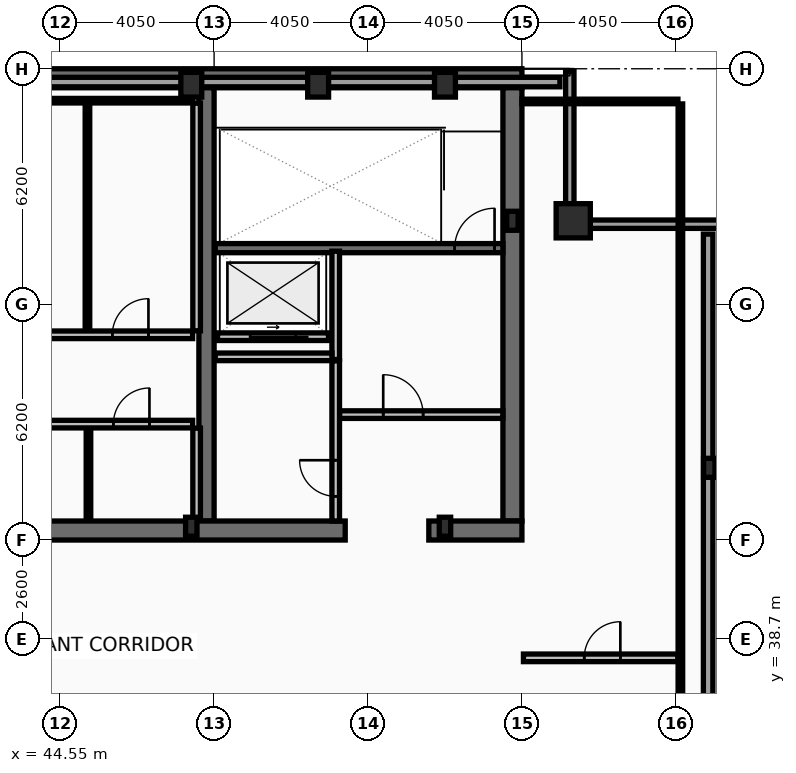
"""IFC4 building model, lengths in metres.
Left out: names, types, materials, properties, quantities, classifications, styles, units other than length and angle.
Written with IfcOpenShell. Run it as: python <this file> out.ifc"""

import sys

from ifc_helpers import new_model, si_unit, direction, frame, frame_2d, origin, origin_2d, place, context, subcontext, project, spatial, rectangle, hollow_rectangle, i_section, extrude, element, fill, save


model = new_model("IFC4")
c1 = context("Model", 3, precision=1e-05, world=origin(), true_north=direction((0.0, 1.0)))
c2 = subcontext(c1, "Body", "Model", "MODEL_VIEW")
j1 = project(units=[si_unit("LENGTHUNIT", "METRE"), si_unit("PLANEANGLEUNIT", "RADIAN")], contexts=[c1])
p1 = place(None, origin())
s1 = spatial("IfcSite", under=j1, at=p1, CompositionType="ELEMENT")
p2 = place(p1, origin())
s2 = spatial("IfcBuilding", under=s1, at=p2, CompositionType="ELEMENT")
p3 = place(p2, frame((0.0, 0.0, 378.6)))
s3 = spatial("IfcBuildingStorey", under=s2, at=p3, CompositionType="ELEMENT", Elevation=378.6)
p4 = place(p3, frame((16.2, 53.45, 0.0), z_axis=(0.0, 0.0, 1.0), x_axis=(1.0, 0.0, 0.0)))
e1 = element("IfcWall", 1, at=p4, inside=s3, PredefinedType="SHEAR", context=c2, shape_type="SweptSolid", body=[
    extrude(rectangle(XDim=40.5, YDim=0.5, at=frame_2d((20.25, 0.0))), origin(), (0.0, 0.0, 1.0), 4.0),
])
p5 = place(p3, frame((56.45, 53.2, 0.0), z_axis=(0.0, 0.0, 1.0), x_axis=(0.0, -1.0, 0.0)))
e2 = element("IfcWall", 2, at=p5, inside=s3, PredefinedType="SHEAR", context=c2, shape_type="SweptSolid", body=[
    extrude(rectangle(XDim=11.4, YDim=0.5, at=frame_2d((5.7, 0.0))), origin(), (0.0, 0.0, 1.0), 4.0),
])
p6 = place(p3, frame((48.4, 41.8, 0.0), z_axis=(0.0, 0.0, 1.0), x_axis=(0.0, 1.0, 0.0)))
e3 = element("IfcWall", 3, at=p6, inside=s3, PredefinedType="SHEAR", context=c2, shape_type="SweptSolid", body=[
    extrude(rectangle(XDim=11.4, YDim=0.4, at=frame_2d((5.7, 0.0))), origin(), (0.0, 0.0, 1.0), 4.0),
])
p7 = place(p3, frame((52.05, 41.55, 0.0), z_axis=(0.0, 0.0, 1.0), x_axis=(-1.0, 0.0, 0.0)))
e4 = element("IfcWall", 4, at=p7, inside=s3, PredefinedType="SHEAR", context=c2, shape_type="SweptSolid", body=[
    extrude(rectangle(XDim=11.3, YDim=0.5, at=frame_2d((5.65, 0.0))), origin(), (0.0, 0.0, 1.0), 4.0),
])
p8 = place(p3, frame((56.7, 41.55, 0.0), z_axis=(0.0, 0.0, 1.0), x_axis=(-1.0, 0.0, 0.0)))
e5 = element("IfcWall", 5, at=p8, inside=s3, PredefinedType="SHEAR", context=c2, shape_type="SweptSolid", body=[
    extrude(rectangle(XDim=2.45, YDim=0.5, at=frame_2d((1.225, 0.0))), origin(), (0.0, 0.0, 1.0), 4.0),
])
p9 = place(p3, frame((48.63, 48.98, 0.0), z_axis=(0.0, 0.0, 1.0), x_axis=(1.0, 0.0, 0.0)))
e6 = element("IfcWall", 6, at=p9, inside=s3, PredefinedType="SHEAR", context=c2, shape_type="SweptSolid", body=[
    extrude(rectangle(XDim=7.57, YDim=0.24, at=frame_2d((3.785, 0.0))), origin(), (0.0, 0.0, 1.0), 4.0),
])
p10 = place(p9, frame((6.3, 0.0, 0.0)))
e7 = element("IfcOpeningElement", 7, at=p10, cuts=e6, PredefinedType="OPENING", context=c2, shape_type="SweptSolid", body=[
    extrude(rectangle(XDim=1.05, YDim=2.15, at=frame_2d((0.525, 1.075))), frame((0.0, 0.13, 0.0), z_axis=(0.0, -1.0, 0.0), x_axis=(1.0, 0.0, 0.0)), (0.0, 0.0, 1.0), 0.26),
])
p11 = place(p3, frame((58.05, 49.7, 0.0), z_axis=(0.0, 0.0, 1.0), x_axis=(1.0, 0.0, 0.0)))
e8 = element("IfcColumn", 8, at=p11, inside=s3, PredefinedType="COLUMN", context=c2, shape_type="SweptSolid", body=[
    extrude(hollow_rectangle(XDim=0.9, YDim=0.9, WallThickness=0.05, at=origin_2d()), origin(), (0.0, 0.0, 1.0), 5.36),
])
for number, where, z_axis, x_axis in (
    (9, (48.0, 53.28, 0.0), (0.0, 0.0, 1.0), (1.0, 0.0, 0.0)),
    (10, (51.337, 53.28, 0.0), (0.0, 0.0, 1.0), (1.0, 0.0, 0.0)),
    (11, (54.675, 53.28, 0.0), (0.0, 0.0, 1.0), (1.0, 0.0, 0.0)),
):
    element("IfcColumn", number, at=place(p3, frame(where, z_axis=z_axis, x_axis=x_axis)), inside=s3, PredefinedType="COLUMN", context=c2, shape_type="SweptSolid", body=[
        extrude(hollow_rectangle(XDim=0.55, YDim=0.65, WallThickness=0.04, at=origin_2d()), origin(), (0.0, 0.0, 1.0), 5.36),
    ])
for number, where, z_axis, x_axis in (
    (12, (61.63, 43.2, 0.0), (0.0, 0.0, 1.0), (1.0, 0.0, 0.0)),
    (13, (56.45, 49.7, 0.0), (0.0, 0.0, 1.0), (1.0, 0.0, 0.0)),
    (14, (48.0, 41.65, 0.0), (0.0, 0.0, 1.0), (1.0, 0.0, 0.0)),
):
    element("IfcColumn", number, at=place(p3, frame(where, z_axis=z_axis, x_axis=x_axis)), inside=s3, PredefinedType="COLUMN", context=c2, shape_type="SweptSolid", body=[
        extrude(i_section(OverallWidth=0.3, OverallDepth=0.5, WebThickness=0.014, FlangeThickness=0.028, at=origin_2d()), origin(), (0.0, 0.0, 1.0), 5.36),
    ])
p12 = place(p3, frame((54.675, 41.65, 0.0), z_axis=(0.0, 0.0, 1.0), x_axis=(1.0, 0.0, 0.0)))
e15 = element("IfcColumn", 15, at=p12, inside=s3, PredefinedType="COLUMN", context=c2, shape_type="SweptSolid", body=[
    extrude(i_section(OverallWidth=0.3, OverallDepth=0.5, WebThickness=0.014, FlangeThickness=0.028, at=origin_2d()), origin(), (0.0, 0.0, 1.0), 4.1),
])
p13 = place(p3, frame((57.96, 53.63, 0.0), z_axis=(0.0, 0.0, 1.0), x_axis=(0.0, -1.0, 0.0)))
e16 = element("IfcWall", 16, at=p13, inside=s3, PredefinedType="SOLIDWALL", context=c2, shape_type="SweptSolid", body=[
    extrude(rectangle(XDim=3.91, YDim=0.22, at=frame_2d((1.955, 0.0))), origin(), (0.0, 0.0, 1.0), 3.62),
])
p14 = place(p3, frame((57.85, 49.61, 0.0), z_axis=(0.0, 0.0, 1.0), x_axis=(1.0, 0.0, 0.0)))
e17 = element("IfcWall", 17, at=p14, inside=s3, PredefinedType="SOLIDWALL", context=c2, shape_type="SweptSolid", body=[
    extrude(rectangle(XDim=4.13, YDim=0.22, at=frame_2d((2.065, 0.0))), origin(), (0.0, 0.0, 1.0), 3.62),
])
p15 = place(p3, frame((57.7, 53.35, 5.58), z_axis=(0.0, 0.0, 1.0), x_axis=(-1.0, 0.0, 0.0)))
e18 = element("IfcWall", 18, at=p15, inside=s3, PredefinedType="PARAPET", context=c2, shape_type="SweptSolid", body=[
    extrude(rectangle(XDim=42.5, YDim=0.25, at=frame_2d((21.25, 0.0))), origin(), (0.0, 0.0, 1.0), 0.9),
])
p16 = place(p3, frame((61.6, 14.05, 5.58), z_axis=(0.0, 0.0, 1.0), x_axis=(0.0, 1.0, 0.0)))
e19 = element("IfcWall", 19, at=p16, inside=s3, PredefinedType="PARAPET", context=c2, shape_type="SweptSolid", body=[
    extrude(rectangle(XDim=35.3, YDim=0.25, at=frame_2d((17.65, 0.0))), origin(), (0.0, 0.0, 1.0), 0.9),
])
p17 = place(p3, frame((51.61, 46.65, 0.0), z_axis=(0.0, 0.0, 1.0), x_axis=(-1.0, 0.0, 0.0)))
e20 = element("IfcWall", 20, at=p17, inside=s3, PredefinedType="PARTITIONING", context=c2, shape_type="SweptSolid", body=[
    extrude(rectangle(XDim=2.92, YDim=0.2, at=frame_2d((1.46, 0.0))), origin(), (0.0, 0.0, 1.0), 4.18),
])
p18 = place(p17, frame((0.86, 0.0, 0.0)))
e21 = element("IfcOpeningElement", 21, at=p18, cuts=e20, PredefinedType="OPENING", context=c2, shape_type="SweptSolid", body=[
    extrude(rectangle(XDim=1.2, YDim=2.18, at=frame_2d((0.6, 1.09))), frame((0.0, 0.11, 0.0), z_axis=(0.0, -1.0, 0.0), x_axis=(1.0, 0.0, 0.0)), (0.0, 0.0, 1.0), 0.22),
])
p19 = place(p3, frame((51.8, 46.05, 0.0), z_axis=(0.0, 0.0, 1.0), x_axis=(0.0, 1.0, 0.0)))
e22 = element("IfcWall", 22, at=p19, inside=s3, PredefinedType="PARTITIONING", context=c2, shape_type="SweptSolid", body=[
    extrude(rectangle(XDim=2.85, YDim=0.2, at=frame_2d((1.425, 0.0))), origin(), (0.0, 0.0, 1.0), 4.18),
])
p20 = place(p3, frame((51.9, 44.6, 0.0), z_axis=(0.0, 0.0, 1.0), x_axis=(1.0, 0.0, 0.0)))
e23 = element("IfcWall", 23, at=p20, inside=s3, PredefinedType="PARTITIONING", context=c2, shape_type="SweptSolid", body=[
    extrude(rectangle(XDim=4.3, YDim=0.2, at=frame_2d((2.15, 0.0))), origin(), (0.0, 0.0, 1.0), 4.18),
])
p21 = place(p20, frame((1.15, 0.0, 0.0)))
e24 = element("IfcOpeningElement", 24, at=p21, cuts=e23, PredefinedType="OPENING", context=c2, shape_type="SweptSolid", body=[
    extrude(rectangle(XDim=1.05, YDim=2.15, at=frame_2d((0.525, 1.075))), frame((0.0, 0.11, 0.0), z_axis=(0.0, -1.0, 0.0), x_axis=(1.0, 0.0, 0.0)), (0.0, 0.0, 1.0), 0.22),
])
p22 = place(p3, frame((48.63, 46.12, 0.0), z_axis=(0.0, 0.0, 1.0), x_axis=(1.0, 0.0, 0.0)))
e25 = element("IfcWall", 25, at=p22, inside=s3, PredefinedType="PARTITIONING", context=c2, shape_type="SweptSolid", body=[
    extrude(rectangle(XDim=3.07, YDim=0.2, at=frame_2d((1.535, 0.0))), origin(), (0.0, 0.0, 1.0), 4.18),
])
p23 = place(p3, frame((51.8, 41.8, 0.0), z_axis=(0.0, 0.0, 1.0), x_axis=(0.0, 1.0, 0.0)))
e26 = element("IfcWall", 26, at=p23, inside=s3, PredefinedType="PARTITIONING", context=c2, shape_type="SweptSolid", body=[
    extrude(rectangle(XDim=4.215, YDim=0.2, at=frame_2d((2.107, 0.0))), origin(), (0.0, 0.0, 1.0), 4.18),
])
p24 = place(p23, frame((0.65, 0.0, 0.0)))
e27 = element("IfcOpeningElement", 27, at=p24, cuts=e26, PredefinedType="OPENING", context=c2, shape_type="SweptSolid", body=[
    extrude(rectangle(XDim=0.95, YDim=2.1, at=frame_2d((0.475, 1.05))), frame((0.0, 0.11, 0.0), z_axis=(0.0, -1.0, 0.0), x_axis=(1.0, 0.0, 0.0)), (0.0, 0.0, 1.0), 0.22),
])
p25 = place(p3, frame((48.14, 46.805, 0.0), z_axis=(0.0, 0.0, 1.0), x_axis=(0.0, 1.0, 0.0)))
e28 = element("IfcWall", 28, at=p25, inside=s3, PredefinedType="PARTITIONING", context=c2, shape_type="SweptSolid", body=[
    extrude(rectangle(XDim=5.99, YDim=0.2, at=frame_2d((2.995, 0.0))), origin(), (0.0, 0.0, 1.0), 4.18),
])
p26 = place(p3, frame((40.685, 52.86, 0.0), z_axis=(0.0, 0.0, 1.0), x_axis=(1.0, 0.0, 0.0)))
e29 = element("IfcWall", 29, at=p26, inside=s3, PredefinedType="PARTITIONING", context=c2, shape_type="SweptSolid", body=[
    extrude(rectangle(XDim=7.35, YDim=0.12, at=frame_2d((3.675, 0.0))), origin(), (0.0, 0.0, 1.0), 4.18),
])
p27 = place(p3, frame((45.267, 46.805, 0.0), z_axis=(0.0, 0.0, 1.0), x_axis=(0.0, 1.0, 0.0)))
e30 = element("IfcWall", 30, at=p27, inside=s3, PredefinedType="PARTITIONING", context=c2, shape_type="SweptSolid", body=[
    extrude(rectangle(XDim=5.99, YDim=0.12, at=frame_2d((2.995, 0.0))), origin(), (0.0, 0.0, 1.0), 4.18),
])
p28 = place(p3, frame((40.685, 46.7, 0.0), z_axis=(0.0, 0.0, 1.0), x_axis=(1.0, 0.0, 0.0)))
e31 = element("IfcWall", 31, at=p28, inside=s3, PredefinedType="PARTITIONING", context=c2, shape_type="SweptSolid", body=[
    extrude(rectangle(XDim=7.35, YDim=0.2, at=frame_2d((3.675, 0.0))), origin(), (0.0, 0.0, 1.0), 4.18),
])
p29 = place(p28, frame((1.15, 0.0, 0.0)))
e32 = element("IfcOpeningElement", 32, at=p29, cuts=e31, PredefinedType="OPENING", context=c2, shape_type="SweptSolid", body=[
    extrude(rectangle(XDim=0.95, YDim=2.1, at=frame_2d((0.475, 1.05))), frame((0.0, 0.11, 0.0), z_axis=(0.0, -1.0, 0.0), x_axis=(1.0, 0.0, 0.0)), (0.0, 0.0, 1.0), 0.22),
])
p30 = place(p28, frame((5.237, 0.0, 0.0)))
e33 = element("IfcOpeningElement", 33, at=p30, cuts=e31, PredefinedType="OPENING", context=c2, shape_type="SweptSolid", body=[
    extrude(rectangle(XDim=0.95, YDim=2.1, at=frame_2d((0.475, 1.05))), frame((0.0, 0.11, 0.0), z_axis=(0.0, -1.0, 0.0), x_axis=(1.0, 0.0, 0.0)), (0.0, 0.0, 1.0), 0.22),
])
p31 = place(p3, frame((48.14, 41.85, 0.0), z_axis=(0.0, 0.0, 1.0), x_axis=(0.0, 1.0, 0.0)))
e34 = element("IfcWall", 34, at=p31, inside=s3, PredefinedType="PARTITIONING", context=c2, shape_type="SweptSolid", body=[
    extrude(rectangle(XDim=2.395, YDim=0.2, at=frame_2d((1.198, 0.0))), origin(), (0.0, 0.0, 1.0), 4.18),
])
p32 = place(p3, frame((45.294, 41.85, 0.0), z_axis=(0.0, 0.0, 1.0), x_axis=(0.0, 1.0, 0.0)))
e35 = element("IfcWall", 35, at=p32, inside=s3, PredefinedType="PARTITIONING", context=c2, shape_type="SweptSolid", body=[
    extrude(rectangle(XDim=2.395, YDim=0.12, at=frame_2d((1.198, 0.0))), origin(), (0.0, 0.0, 1.0), 4.18),
])
p33 = place(p3, frame((40.755, 44.35, 0.0), z_axis=(0.0, 0.0, 1.0), x_axis=(1.0, 0.0, 0.0)))
e36 = element("IfcWall", 36, at=p33, inside=s3, PredefinedType="PARTITIONING", context=c2, shape_type="SweptSolid", body=[
    extrude(rectangle(XDim=7.28, YDim=0.2, at=frame_2d((3.64, 0.0))), origin(), (0.0, 0.0, 1.0), 4.18),
])
p34 = place(p33, frame((1.15, 0.0, 0.0)))
e37 = element("IfcOpeningElement", 37, at=p34, cuts=e36, PredefinedType="OPENING", context=c2, shape_type="SweptSolid", body=[
    extrude(rectangle(XDim=0.95, YDim=2.1, at=frame_2d((0.475, 1.05))), frame((0.0, 0.11, 0.0), z_axis=(0.0, -1.0, 0.0), x_axis=(1.0, 0.0, 0.0)), (0.0, 0.0, 1.0), 0.22),
])
p35 = place(p33, frame((5.194, 0.0, 0.0)))
e38 = element("IfcOpeningElement", 38, at=p35, cuts=e36, PredefinedType="OPENING", context=c2, shape_type="SweptSolid", body=[
    extrude(rectangle(XDim=0.95, YDim=2.1, at=frame_2d((0.475, 1.05))), frame((0.0, 0.11, 0.0), z_axis=(0.0, -1.0, 0.0), x_axis=(1.0, 0.0, 0.0)), (0.0, 0.0, 1.0), 0.22),
])
p36 = place(p3, frame((56.74, 38.2, 0.0), z_axis=(0.0, 0.0, 1.0), x_axis=(1.0, 0.0, 0.0)))
e39 = element("IfcWall", 39, at=p36, inside=s3, PredefinedType="PARTITIONING", context=c2, shape_type="SweptSolid", body=[
    extrude(rectangle(XDim=4.065, YDim=0.2, at=frame_2d((2.032, 0.0))), origin(), (0.0, 0.0, 1.0), 4.18),
])
p37 = place(p36, frame((1.6, 0.0, 0.0)))
e40 = element("IfcOpeningElement", 40, at=p37, cuts=e39, PredefinedType="OPENING", context=c2, shape_type="SweptSolid", body=[
    extrude(rectangle(XDim=0.95, YDim=2.1, at=frame_2d((0.475, 1.05))), frame((0.0, 0.11, 0.0), z_axis=(0.0, -1.0, 0.0), x_axis=(1.0, 0.0, 0.0)), (0.0, 0.0, 1.0), 0.22),
])
p38 = place(p3, frame((60.87, 10.665, 0.0), z_axis=(0.0, 0.0, 1.0), x_axis=(0.0, 1.0, 0.0)))
e41 = element("IfcWall", 41, at=p38, inside=s3, PredefinedType="PARTITIONING", context=c2, shape_type="SweptSolid", body=[
    extrude(rectangle(XDim=42.11, YDim=0.12, at=frame_2d((21.055, 0.0))), origin(), (0.0, 0.0, 1.0), 4.18),
])
p39 = place(p3, frame((56.7, 52.84, 0.0), z_axis=(0.0, 0.0, 1.0), x_axis=(1.0, 0.0, 0.0)))
e42 = element("IfcWall", 42, at=p39, inside=s3, PredefinedType="PARTITIONING", context=c2, shape_type="SweptSolid", body=[
    extrude(rectangle(XDim=4.105, YDim=0.12, at=frame_2d((2.052, 0.0))), origin(), (0.0, 0.0, 1.0), 4.18),
])
p40 = place(p10, origin())
e43 = element("IfcDoor", 43, at=p40, inside=s3, OperationType="SINGLE_SWING_RIGHT", PredefinedType="DOOR", context=c2, shape_type="SweptSolid", body=[
    extrude(rectangle(XDim=1.05, YDim=2.15, at=frame_2d((0.525, 1.075))), frame((0.0, 0.025, 0.0), z_axis=(0.0, -1.0, 0.0), x_axis=(1.0, 0.0, 0.0)), (0.0, 0.0, 1.0), 0.05),
])
fill(e7, e43)
p41 = place(p18, origin())
e44 = element("IfcDoor", 44, at=p41, inside=s3, OperationType="SLIDING_TO_LEFT", PredefinedType="DOOR", context=c2, shape_type="SweptSolid", body=[
    extrude(rectangle(XDim=1.2, YDim=2.18, at=frame_2d((0.6, 1.09))), frame((0.0, 0.025, 0.0), z_axis=(0.0, -1.0, 0.0), x_axis=(1.0, 0.0, 0.0)), (0.0, 0.0, 1.0), 0.05),
])
fill(e21, e44)
p42 = place(p21, origin())
e45 = element("IfcDoor", 45, at=p42, inside=s3, OperationType="SINGLE_SWING_LEFT", PredefinedType="DOOR", context=c2, shape_type="SweptSolid", body=[
    extrude(rectangle(XDim=1.05, YDim=2.15, at=frame_2d((0.525, 1.075))), frame((0.0, 0.025, 0.0), z_axis=(0.0, -1.0, 0.0), x_axis=(1.0, 0.0, 0.0)), (0.0, 0.0, 1.0), 0.05),
])
fill(e24, e45)
p43 = place(p24, origin())
e46 = element("IfcDoor", 46, at=p43, inside=s3, OperationType="SINGLE_SWING_RIGHT", PredefinedType="DOOR", context=c2, shape_type="SweptSolid", body=[
    extrude(rectangle(XDim=0.95, YDim=2.1, at=frame_2d((0.475, 1.05))), frame((0.0, 0.025, 0.0), z_axis=(0.0, -1.0, 0.0), x_axis=(1.0, 0.0, 0.0)), (0.0, 0.0, 1.0), 0.05),
])
fill(e27, e46)
p44 = place(p30, origin())
e47 = element("IfcDoor", 47, at=p44, inside=s3, OperationType="SINGLE_SWING_RIGHT", PredefinedType="DOOR", context=c2, shape_type="SweptSolid", body=[
    extrude(rectangle(XDim=0.95, YDim=2.1, at=frame_2d((0.475, 1.05))), frame((0.0, 0.025, 0.0), z_axis=(0.0, -1.0, 0.0), x_axis=(1.0, 0.0, 0.0)), (0.0, 0.0, 1.0), 0.05),
])
fill(e33, e47)
p45 = place(p35, origin())
e48 = element("IfcDoor", 48, at=p45, inside=s3, OperationType="SINGLE_SWING_RIGHT", PredefinedType="DOOR", context=c2, shape_type="SweptSolid", body=[
    extrude(rectangle(XDim=0.95, YDim=2.1, at=frame_2d((0.475, 1.05))), frame((0.0, 0.025, 0.0), z_axis=(0.0, -1.0, 0.0), x_axis=(1.0, 0.0, 0.0)), (0.0, 0.0, 1.0), 0.05),
])
fill(e38, e48)
p46 = place(p37, origin())
e49 = element("IfcDoor", 49, at=p46, inside=s3, OperationType="SINGLE_SWING_RIGHT", PredefinedType="DOOR", context=c2, shape_type="SweptSolid", body=[
    extrude(rectangle(XDim=0.95, YDim=2.1, at=frame_2d((0.475, 1.05))), frame((0.0, 0.025, 0.0), z_axis=(0.0, -1.0, 0.0), x_axis=(1.0, 0.0, 0.0)), (0.0, 0.0, 1.0), 0.05),
])
fill(e40, e49)
save(model, sys.argv[1])
